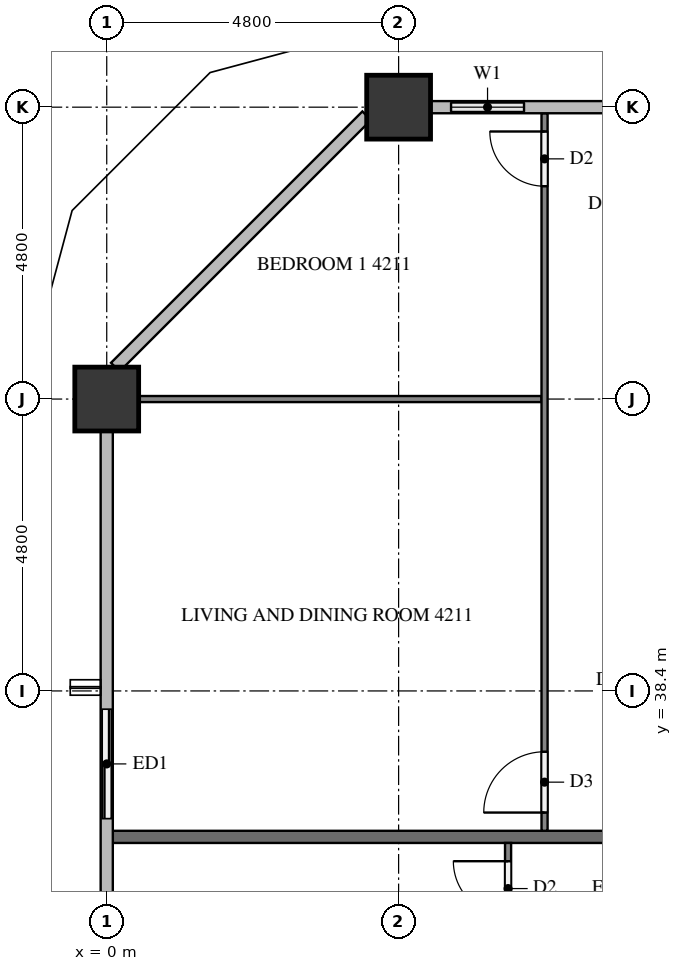
"""IFC4 building model, lengths in metres.
Left out: names, types, materials, properties, quantities, classifications, styles, units other than length and angle.
Written with IfcOpenShell. Run it as: python <this file> out.ifc"""

import sys

from ifc_helpers import new_model, si_unit, direction, frame, frame_2d, origin, origin_2d, place, context, subcontext, project, spatial, rectangle, extrude, element, fill, save


model = new_model("IFC4")
c1 = context("Model", 3, precision=1e-05, world=origin(), true_north=direction((0.0, 1.0)))
c2 = subcontext(c1, "Body", "Model", "MODEL_VIEW")
j1 = project(units=[si_unit("LENGTHUNIT", "METRE"), si_unit("PLANEANGLEUNIT", "RADIAN")], contexts=[c1])
p1 = place(None, origin())
s1 = spatial("IfcSite", under=j1, at=p1, CompositionType="ELEMENT")
p2 = place(p1, origin())
s2 = spatial("IfcBuilding", under=s1, at=p2, CompositionType="ELEMENT")
p3 = place(p2, frame((0.0, 0.0, 163.0)))
s3 = spatial("IfcBuildingStorey", under=s2, at=p3, CompositionType="ELEMENT", Elevation=163.0)
for number, where, z_axis, x_axis in (
    (1, (4.8, 48.0, 0.0), (0.0, 0.0, 1.0), (1.0, 0.0, 0.0)),
    (2, (0.0, 43.2, 0.0), (0.0, 0.0, 1.0), (1.0, 0.0, 0.0)),
):
    element("IfcColumn", number, at=place(p3, frame(where, z_axis=z_axis, x_axis=x_axis)), inside=s3, PredefinedType="COLUMN", context=c2, shape_type="SweptSolid", body=[
        extrude(rectangle(XDim=1.05, YDim=1.05, at=origin_2d()), origin(), (0.0, 0.0, 1.0), 3.2),
    ])
p4 = place(p3, frame((7.2, 48.0, 0.0), z_axis=(0.0, 0.0, 1.0), x_axis=(-1.0, 0.0, 0.0)))
e3 = element("IfcWall", 3, at=p4, inside=s3, PredefinedType="SOLIDWALL", context=c2, shape_type="SweptSolid", body=[
    extrude(rectangle(XDim=1.875, YDim=0.15, at=frame_2d((0.938, 0.0))), origin(), (0.0, 0.0, 1.0), 3.2),
])
p5 = place(p4, frame((0.337, 0.0, 0.9)))
e4 = element("IfcOpeningElement", 4, at=p5, cuts=e3, PredefinedType="OPENING", context=c2, shape_type="SweptSolid", body=[
    extrude(rectangle(XDim=1.2, YDim=1.4, at=frame_2d((0.6, 0.7))), frame((0.0, 0.085, 0.0), z_axis=(0.0, -1.0, 0.0), x_axis=(1.0, 0.0, 0.0)), (0.0, 0.0, 1.0), 0.17),
])
p6 = place(p3, frame((0.0, 38.4, 0.0), z_axis=(0.0, 0.0, 1.0), x_axis=(0.0, -1.0, 0.0)))
e5 = element("IfcWall", 5, at=p6, inside=s3, PredefinedType="SOLIDWALL", context=c2, shape_type="SweptSolid", body=[
    extrude(rectangle(XDim=2.4, YDim=0.15, at=frame_2d((1.2, 0.0))), origin(), (0.0, 0.0, 1.0), 3.2),
])
p7 = place(p6, frame((0.3, 0.0, 0.0)))
e6 = element("IfcOpeningElement", 6, at=p7, cuts=e5, PredefinedType="OPENING", context=c2, shape_type="SweptSolid", body=[
    extrude(rectangle(XDim=1.8, YDim=2.4, at=frame_2d((0.9, 1.2))), frame((0.0, 0.085, 0.0), z_axis=(0.0, -1.0, 0.0), x_axis=(1.0, 0.0, 0.0)), (0.0, 0.0, 1.0), 0.17),
])
p8 = place(p3, frame((0.1, 36.0, 0.0), z_axis=(0.0, 0.0, 1.0), x_axis=(1.0, 0.0, 0.0)))
e7 = element("IfcWall", 7, at=p8, inside=s3, PredefinedType="PARTITIONING", context=c2, shape_type="SweptSolid", body=[
    extrude(rectangle(XDim=11.8, YDim=0.2, at=frame_2d((5.9, 0.0))), origin(), (0.0, 0.0, 1.0), 3.2),
])
p9 = place(p3, frame((7.15, 43.2, 0.0), z_axis=(0.0, 0.0, 1.0), x_axis=(-1.0, 0.0, 0.0)))
e8 = element("IfcWall", 8, at=p9, inside=s3, PredefinedType="PARTITIONING", context=c2, shape_type="SweptSolid", body=[
    extrude(rectangle(XDim=6.625, YDim=0.1, at=frame_2d((3.312, 0.0))), origin(), (0.0, 0.0, 1.0), 3.2),
])
p10 = place(p3, frame((7.2, 36.1, 0.0), z_axis=(0.0, 0.0, 1.0), x_axis=(0.0, 1.0, 0.0)))
e9 = element("IfcWall", 9, at=p10, inside=s3, PredefinedType="PARTITIONING", context=c2, shape_type="SweptSolid", body=[
    extrude(rectangle(XDim=11.8, YDim=0.1, at=frame_2d((5.9, 0.0))), origin(), (0.0, 0.0, 1.0), 3.2),
])
p11 = place(p10, frame((0.3, 0.0, 0.0)))
e10 = element("IfcOpeningElement", 10, at=p11, cuts=e9, PredefinedType="OPENING", context=c2, shape_type="SweptSolid", body=[
    extrude(rectangle(XDim=1.0, YDim=2.1, at=frame_2d((0.5, 1.05))), frame((0.0, 0.06, 0.0), z_axis=(0.0, -1.0, 0.0), x_axis=(1.0, 0.0, 0.0)), (0.0, 0.0, 1.0), 0.12),
])
p12 = place(p10, frame((10.6, 0.0, 0.0)))
e11 = element("IfcOpeningElement", 11, at=p12, cuts=e9, PredefinedType="OPENING", context=c2, shape_type="SweptSolid", body=[
    extrude(rectangle(XDim=0.9, YDim=2.1, at=frame_2d((0.45, 1.05))), frame((0.0, 0.06, 0.0), z_axis=(0.0, -1.0, 0.0), x_axis=(1.0, 0.0, 0.0)), (0.0, 0.0, 1.0), 0.12),
])
p13 = place(p3, frame((6.6, 26.5, 0.0), z_axis=(0.0, 0.0, 1.0), x_axis=(0.0, 1.0, 0.0)))
e12 = element("IfcWall", 12, at=p13, inside=s3, PredefinedType="PARTITIONING", context=c2, shape_type="SweptSolid", body=[
    extrude(rectangle(XDim=9.4, YDim=0.1, at=frame_2d((4.7, 0.0))), origin(), (0.0, 0.0, 1.0), 3.2),
])
p14 = place(p13, frame((8.2, 0.0, 0.0)))
e13 = element("IfcOpeningElement", 13, at=p14, cuts=e12, PredefinedType="OPENING", context=c2, shape_type="SweptSolid", body=[
    extrude(rectangle(XDim=0.9, YDim=2.1, at=frame_2d((0.45, 1.05))), frame((0.0, 0.06, 0.0), z_axis=(0.0, -1.0, 0.0), x_axis=(1.0, 0.0, 0.0)), (0.0, 0.0, 1.0), 0.12),
])
p15 = place(p13, frame((0.3, 0.0, 0.0)))
e14 = element("IfcOpeningElement", 14, at=p15, cuts=e12, PredefinedType="OPENING", context=c2, shape_type="SweptSolid", body=[
    extrude(rectangle(XDim=1.0, YDim=2.1, at=frame_2d((0.5, 1.05))), frame((0.0, 0.06, 0.0), z_axis=(0.0, -1.0, 0.0), x_axis=(1.0, 0.0, 0.0)), (0.0, 0.0, 1.0), 0.12),
])
p16 = place(p5, origin())
e15 = element("IfcWindow", 15, at=p16, inside=s3, PartitioningType="SINGLE_PANEL", PredefinedType="WINDOW", context=c2, shape_type="SweptSolid", body=[
    extrude(rectangle(XDim=1.2, YDim=1.4, at=frame_2d((0.6, 0.7))), frame((0.0, 0.03, 0.0), z_axis=(0.0, -1.0, 0.0), x_axis=(1.0, 0.0, 0.0)), (0.0, 0.0, 1.0), 0.06),
])
fill(e4, e15)
p17 = place(p7, origin())
e16 = element("IfcDoor", 16, at=p17, inside=s3, OperationType="SLIDING_TO_LEFT", PredefinedType="DOOR", context=c2, shape_type="SweptSolid", body=[
    extrude(rectangle(XDim=1.8, YDim=2.4, at=frame_2d((0.9, 1.2))), frame((0.0, 0.025, 0.0), z_axis=(0.0, -1.0, 0.0), x_axis=(1.0, 0.0, 0.0)), (0.0, 0.0, 1.0), 0.05),
])
fill(e6, e16)
p18 = place(p11, origin())
e17 = element("IfcDoor", 17, at=p18, inside=s3, OperationType="SINGLE_SWING_LEFT", PredefinedType="DOOR", context=c2, shape_type="SweptSolid", body=[
    extrude(rectangle(XDim=1.0, YDim=2.1, at=frame_2d((0.5, 1.05))), frame((0.0, 0.025, 0.0), z_axis=(0.0, -1.0, 0.0), x_axis=(1.0, 0.0, 0.0)), (0.0, 0.0, 1.0), 0.05),
])
fill(e10, e17)
p19 = place(p12, origin())
e18 = element("IfcDoor", 18, at=p19, inside=s3, OperationType="SINGLE_SWING_RIGHT", PredefinedType="DOOR", context=c2, shape_type="SweptSolid", body=[
    extrude(rectangle(XDim=0.9, YDim=2.1, at=frame_2d((0.45, 1.05))), frame((0.0, 0.025, 0.0), z_axis=(0.0, -1.0, 0.0), x_axis=(1.0, 0.0, 0.0)), (0.0, 0.0, 1.0), 0.05),
])
fill(e11, e18)
p20 = place(p14, origin())
e19 = element("IfcDoor", 19, at=p20, inside=s3, OperationType="SINGLE_SWING_RIGHT", PredefinedType="DOOR", context=c2, shape_type="SweptSolid", body=[
    extrude(rectangle(XDim=0.9, YDim=2.1, at=frame_2d((0.45, 1.05))), frame((0.0, 0.025, 0.0), z_axis=(0.0, -1.0, 0.0), x_axis=(1.0, 0.0, 0.0)), (0.0, 0.0, 1.0), 0.05),
])
fill(e13, e19)
save(model, sys.argv[1])
